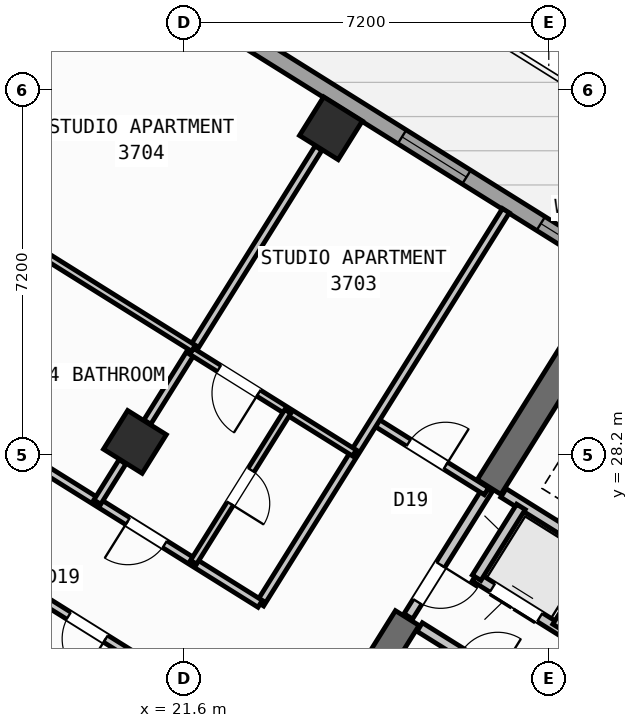
"""IFC4 building model, lengths in metres.
Left out: names, types, materials, properties, quantities, classifications, styles, units other than length and angle.
Written with IfcOpenShell. Run it as: python <this file> out.ifc"""

import sys

from ifc_helpers import new_model, si_unit, direction, frame, frame_2d, origin, origin_2d, place, context, subcontext, project, spatial, rectangle, hollow_rectangle, extrude, source, transform, mapped, element, fill, save


model = new_model("IFC4")
c1 = context("Model", 3, precision=1e-05, world=origin(), true_north=direction((0.0, 1.0)))
c2 = subcontext(c1, "Body", "Model", "MODEL_VIEW")
j1 = project(units=[si_unit("LENGTHUNIT", "METRE"), si_unit("PLANEANGLEUNIT", "RADIAN")], contexts=[c1])
p1 = place(None, origin())
s1 = spatial("IfcSite", under=j1, at=p1, CompositionType="ELEMENT")
p2 = place(p1, origin())
s2 = spatial("IfcBuilding", under=s1, at=p2, CompositionType="ELEMENT")
p3 = place(p2, frame((0.0, 0.0, 147.9)))
s3 = spatial("IfcBuildingStorey", under=s2, at=p3, CompositionType="ELEMENT", Elevation=147.9)
p4 = place(p3, frame((29.517, 30.594, 0.0), z_axis=(0.0, 0.0, 1.0), x_axis=(-0.529906864564, -0.848055844204, 0.0)))
e1 = element("IfcWall", 1, at=p4, inside=s3, PredefinedType="SHEAR", context=c2, shape_type="SweptSolid", body=[
    extrude(rectangle(XDim=3.575, YDim=0.55, at=frame_2d((1.788, 0.0))), origin(), (0.0, 0.0, 1.0), 3.35),
])
p5 = place(p3, frame((26.007, 24.976, 0.0), z_axis=(0.0, 0.0, 1.0), x_axis=(-0.529923795287, -0.848045264823, 0.0)))
e2 = element("IfcWall", 2, at=p5, inside=s3, PredefinedType="SHEAR", context=c2, shape_type="SweptSolid", body=[
    extrude(rectangle(XDim=6.425, YDim=0.55, at=frame_2d((3.212, 0.0))), origin(), (0.0, 0.0, 1.0), 3.35),
])
m1 = source(origin(), c2, "Body", "SweptSolid", [
    extrude(hollow_rectangle(XDim=0.9, YDim=0.9, WallThickness=0.036, at=origin_2d()), origin(), (0.0, 0.0, 1.0), 3.6),
])
for number, where, z_axis, x_axis in (
    (3, (24.5, 34.643, 0.0), (0.0, 0.0, 1.0), (-0.848, 0.53, 0.0)),
    (4, (20.632, 28.452, 0.0), (0.0, 0.0, 1.0), (-0.848, 0.53, 0.0)),
):
    element("IfcColumn", number, at=place(p3, frame(where, z_axis=z_axis, x_axis=x_axis)), inside=s3, PredefinedType="COLUMN", context=c2, shape_type="MappedRepresentation", body=[
        mapped(m1, transform((0.0, 0.0, 0.0), scale=1.0)),
    ])
p6 = place(p3, frame((14.138, 41.825, 0.0), z_axis=(0.0, 0.0, 1.0), x_axis=(0.848046498049, -0.529921821731, 0.0)))
e5 = element("IfcWall", 5, at=p6, inside=s3, PredefinedType="STANDARD", context=c2, shape_type="SweptSolid", body=[
    extrude(rectangle(XDim=31.588, YDim=0.32, at=frame_2d((15.794, 0.0))), origin(), (0.0, 0.0, 1.0), 3.35),
])
p7 = place(p6, frame((2.949, 0.0, 0.0)))
e6 = element("IfcOpeningElement", 6, at=p7, cuts=e5, PredefinedType="OPENING", context=c2, shape_type="SweptSolid", body=[
    extrude(rectangle(XDim=1.05, YDim=2.15, at=frame_2d((0.525, 1.075))), frame((0.0, 0.17, 0.0), z_axis=(0.0, -1.0, 0.0), x_axis=(1.0, 0.0, 0.0)), (0.0, 0.0, 1.0), 0.34),
])
p8 = place(p6, frame((0.861, 0.0, 0.85)))
e7 = element("IfcOpeningElement", 7, at=p8, cuts=e5, PredefinedType="OPENING", context=c2, shape_type="SweptSolid", body=[
    extrude(rectangle(XDim=1.5, YDim=1.5, at=frame_2d((0.75, 0.75))), frame((0.0, 0.17, 0.0), z_axis=(0.0, -1.0, 0.0), x_axis=(1.0, 0.0, 0.0)), (0.0, 0.0, 1.0), 0.34),
])
p9 = place(p6, frame((8.494, 0.0, 0.85)))
e8 = element("IfcOpeningElement", 8, at=p9, cuts=e5, PredefinedType="OPENING", context=c2, shape_type="SweptSolid", body=[
    extrude(rectangle(XDim=1.8, YDim=1.5, at=frame_2d((0.9, 0.75))), frame((0.0, 0.17, 0.0), z_axis=(0.0, -1.0, 0.0), x_axis=(1.0, 0.0, 0.0)), (0.0, 0.0, 1.0), 0.34),
])
p10 = place(p6, frame((13.874, 0.0, 0.85)))
e9 = element("IfcOpeningElement", 9, at=p10, cuts=e5, PredefinedType="OPENING", context=c2, shape_type="SweptSolid", body=[
    extrude(rectangle(XDim=1.5, YDim=1.5, at=frame_2d((0.75, 0.75))), frame((0.0, 0.17, 0.0), z_axis=(0.0, -1.0, 0.0), x_axis=(1.0, 0.0, 0.0)), (0.0, 0.0, 1.0), 0.34),
])
p11 = place(p6, frame((17.104, 0.0, 1.0)))
e10 = element("IfcOpeningElement", 10, at=p11, cuts=e5, PredefinedType="OPENING", context=c2, shape_type="SweptSolid", body=[
    extrude(rectangle(XDim=0.9, YDim=1.25, at=frame_2d((0.45, 0.625))), frame((0.0, 0.17, 0.0), z_axis=(0.0, -1.0, 0.0), x_axis=(1.0, 0.0, 0.0)), (0.0, 0.0, 1.0), 0.34),
])
p12 = place(p6, frame((22.144, 0.0, 1.0)))
e11 = element("IfcOpeningElement", 11, at=p12, cuts=e5, PredefinedType="OPENING", context=c2, shape_type="SweptSolid", body=[
    extrude(rectangle(XDim=0.9, YDim=1.25, at=frame_2d((0.45, 0.625))), frame((0.0, 0.17, 0.0), z_axis=(0.0, -1.0, 0.0), x_axis=(1.0, 0.0, 0.0)), (0.0, 0.0, 1.0), 0.34),
])
p13 = place(p6, frame((27.744, 0.0, 1.0)))
e12 = element("IfcOpeningElement", 12, at=p13, cuts=e5, PredefinedType="OPENING", context=c2, shape_type="SweptSolid", body=[
    extrude(rectangle(XDim=0.9, YDim=1.25, at=frame_2d((0.45, 0.625))), frame((0.0, 0.17, 0.0), z_axis=(0.0, -1.0, 0.0), x_axis=(1.0, 0.0, 0.0)), (0.0, 0.0, 1.0), 0.34),
])
p14 = place(p3, frame((31.822, 24.998, 0.0), z_axis=(0.0, 0.0, 1.0), x_axis=(-0.848036912365, 0.52993716162, 0.0)))
e13 = element("IfcWall", 13, at=p14, inside=s3, PredefinedType="STANDARD", context=c2, shape_type="SweptSolid", body=[
    extrude(rectangle(XDim=4.618, YDim=0.2, at=frame_2d((2.309, 0.0))), origin(), (0.0, 0.0, 1.0), 3.34),
])
p15 = place(p3, frame((32.108, 22.814, 0.0), z_axis=(0.0, 0.0, 1.0), x_axis=(-0.848042229521, 0.529928652696, 0.0)))
e14 = element("IfcWall", 14, at=p15, inside=s3, PredefinedType="STANDARD", context=c2, shape_type="SweptSolid", body=[
    extrude(rectangle(XDim=5.62, YDim=0.2, at=frame_2d((2.81, 0.0))), origin(), (0.0, 0.0, 1.0), 3.34),
])
p16 = place(p15, frame((0.39, 0.0, 0.0)))
e15 = element("IfcOpeningElement", 15, at=p16, cuts=e14, PredefinedType="OPENING", context=c2, shape_type="SweptSolid", body=[
    extrude(rectangle(XDim=1.1, YDim=2.15, at=frame_2d((0.55, 1.075))), frame((0.0, 0.11, 0.0), z_axis=(0.0, -1.0, 0.0), x_axis=(1.0, 0.0, 0.0)), (0.0, 0.0, 1.0), 0.22),
])
p17 = place(p15, frame((2.25, 0.0, 0.0)))
e16 = element("IfcOpeningElement", 16, at=p17, cuts=e14, PredefinedType="OPENING", context=c2, shape_type="SweptSolid", body=[
    extrude(rectangle(XDim=1.1, YDim=2.15, at=frame_2d((0.55, 1.075))), frame((0.0, 0.11, 0.0), z_axis=(0.0, -1.0, 0.0), x_axis=(1.0, 0.0, 0.0)), (0.0, 0.0, 1.0), 0.22),
])
p18 = place(p15, frame((4.11, 0.0, 0.0)))
e17 = element("IfcOpeningElement", 17, at=p18, cuts=e14, PredefinedType="OPENING", context=c2, shape_type="SweptSolid", body=[
    extrude(rectangle(XDim=1.1, YDim=2.15, at=frame_2d((0.55, 1.075))), frame((0.0, 0.11, 0.0), z_axis=(0.0, -1.0, 0.0), x_axis=(1.0, 0.0, 0.0)), (0.0, 0.0, 1.0), 0.22),
])
p19 = place(p3, frame((28.25, 27.17, 0.0), z_axis=(0.0, 0.0, 1.0), x_axis=(-0.529905827651, -0.848056492117, 0.0)))
e18 = element("IfcWall", 18, at=p19, inside=s3, PredefinedType="STANDARD", context=c2, shape_type="SweptSolid", body=[
    extrude(rectangle(XDim=1.65, YDim=0.2, at=frame_2d((0.825, 0.0))), origin(), (0.0, 0.0, 1.0), 3.34),
])
p20 = place(p3, frame((29.801, 26.142, 0.0), z_axis=(0.0, 0.0, 1.0), x_axis=(-0.529998940003, -0.847998304005, 0.0)))
e19 = element("IfcWall", 19, at=p20, inside=s3, PredefinedType="STANDARD", context=c2, shape_type="SweptSolid", body=[
    extrude(rectangle(XDim=1.58, YDim=0.2, at=frame_2d((0.79, 0.0))), origin(), (0.0, 0.0, 1.0), 3.34),
])
p21 = place(p3, frame((31.525, 21.504, 0.0), z_axis=(0.0, 0.0, 1.0), x_axis=(-0.848040211232, 0.529931882541, 0.0)))
e20 = element("IfcWall", 20, at=p21, inside=s3, PredefinedType="STANDARD", context=c2, shape_type="SweptSolid", body=[
    extrude(rectangle(XDim=6.218, YDim=0.2, at=frame_2d((3.109, 0.0))), origin(), (0.0, 0.0, 1.0), 3.34),
])
p22 = place(p21, frame((4.4, 0.0, 0.0)))
e21 = element("IfcOpeningElement", 21, at=p22, cuts=e20, PredefinedType="OPENING", context=c2, shape_type="SweptSolid", body=[
    extrude(rectangle(XDim=0.86, YDim=2.05, at=frame_2d((0.43, 1.025))), frame((0.0, 0.11, 0.0), z_axis=(0.0, -1.0, 0.0), x_axis=(1.0, 0.0, 0.0)), (0.0, 0.0, 1.0), 0.22),
])
p23 = place(p21, frame((1.45, 0.0, 0.0)))
e22 = element("IfcOpeningElement", 22, at=p23, cuts=e20, PredefinedType="OPENING", context=c2, shape_type="SweptSolid", body=[
    extrude(rectangle(XDim=0.86, YDim=2.05, at=frame_2d((0.43, 1.025))), frame((0.0, 0.11, 0.0), z_axis=(0.0, -1.0, 0.0), x_axis=(1.0, 0.0, 0.0)), (0.0, 0.0, 1.0), 0.22),
])
p24 = place(p3, frame((27.596, 27.52, 0.0), z_axis=(0.0, 0.0, 1.0), x_axis=(-0.529865479138, -0.848081702443, 0.0)))
e23 = element("IfcWall", 23, at=p24, inside=s3, PredefinedType="STANDARD", context=c2, shape_type="SweptSolid", body=[
    extrude(rectangle(XDim=2.96, YDim=0.2, at=frame_2d((1.48, 0.0))), origin(), (0.0, 0.0, 1.0), 3.34),
])
p25 = place(p24, frame((1.76, 0.0, 0.0)))
e24 = element("IfcOpeningElement", 24, at=p25, cuts=e23, PredefinedType="OPENING", context=c2, shape_type="SweptSolid", body=[
    extrude(rectangle(XDim=0.86, YDim=2.05, at=frame_2d((0.43, 1.025))), frame((0.0, 0.11, 0.0), z_axis=(0.0, -1.0, 0.0), x_axis=(1.0, 0.0, 0.0)), (0.0, 0.0, 1.0), 0.22),
])
p26 = place(p3, frame((27.57, 27.478, 0.0), z_axis=(0.0, 0.0, 1.0), x_axis=(-0.848050851465, 0.529914854792, 0.0)))
e25 = element("IfcWall", 25, at=p26, inside=s3, PredefinedType="PARTITIONING", context=c2, shape_type="SweptSolid", body=[
    extrude(rectangle(XDim=2.61, YDim=0.16, at=frame_2d((1.305, 0.0))), origin(), (0.0, 0.0, 1.0), 3.34),
])
p27 = place(p26, frame((0.95, 0.0, 0.0)))
e26 = element("IfcOpeningElement", 26, at=p27, cuts=e25, PredefinedType="OPENING", context=c2, shape_type="SweptSolid", body=[
    extrude(rectangle(XDim=0.86, YDim=2.05, at=frame_2d((0.43, 1.025))), frame((0.0, 0.09, 0.0), z_axis=(0.0, -1.0, 0.0), x_axis=(1.0, 0.0, 0.0)), (0.0, 0.0, 1.0), 0.18),
])
p28 = place(p3, frame((27.953, 33.016, 0.0), z_axis=(0.0, 0.0, 1.0), x_axis=(-0.529903001606, -0.848058257957, 0.0)))
e27 = element("IfcWall", 27, at=p28, inside=s3, PredefinedType="PARTITIONING", context=c2, shape_type="SweptSolid", body=[
    extrude(rectangle(XDim=9.15, YDim=0.16, at=frame_2d((4.575, 0.0))), origin(), (0.0, 0.0, 1.0), 3.34),
])
p29 = place(p3, frame((23.104, 25.256, 0.0), z_axis=(0.0, 0.0, 1.0), x_axis=(-0.848041752158, 0.529929416617, 0.0)))
e28 = element("IfcWall", 28, at=p29, inside=s3, PredefinedType="PARTITIONING", context=c2, shape_type="SweptSolid", body=[
    extrude(rectangle(XDim=16.73, YDim=0.16, at=frame_2d((8.365, 0.0))), origin(), (0.0, 0.0, 1.0), 3.34),
])
p30 = place(p29, frame((2.22, 0.0, 0.0)))
e29 = element("IfcOpeningElement", 29, at=p30, cuts=e28, PredefinedType="OPENING", context=c2, shape_type="SweptSolid", body=[
    extrude(rectangle(XDim=0.86, YDim=2.05, at=frame_2d((0.43, 1.025))), frame((0.0, 0.09, 0.0), z_axis=(0.0, -1.0, 0.0), x_axis=(1.0, 0.0, 0.0)), (0.0, 0.0, 1.0), 0.18),
])
p31 = place(p29, frame((12.084, 0.0, 0.0)))
e30 = element("IfcOpeningElement", 30, at=p31, cuts=e28, PredefinedType="OPENING", context=c2, shape_type="SweptSolid", body=[
    extrude(rectangle(XDim=1.0, YDim=2.1, at=frame_2d((0.5, 1.05))), frame((0.0, 0.09, 0.0), z_axis=(0.0, -1.0, 0.0), x_axis=(1.0, 0.0, 0.0)), (0.0, 0.0, 1.0), 0.18),
])
p32 = place(p3, frame((21.938, 23.391, 0.0), z_axis=(0.0, 0.0, 1.0), x_axis=(-0.848045850158, 0.529922858565, 0.0)))
e31 = element("IfcWall", 31, at=p32, inside=s3, PredefinedType="PARTITIONING", context=c2, shape_type="SweptSolid", body=[
    extrude(rectangle(XDim=16.73, YDim=0.16, at=frame_2d((8.365, 0.0))), origin(), (0.0, 0.0, 1.0), 3.34),
])
p33 = place(p32, frame((2.22, 0.0, 0.0)))
e32 = element("IfcOpeningElement", 32, at=p33, cuts=e31, PredefinedType="OPENING", context=c2, shape_type="SweptSolid", body=[
    extrude(rectangle(XDim=0.86, YDim=2.05, at=frame_2d((0.43, 1.025))), frame((0.0, 0.09, 0.0), z_axis=(0.0, -1.0, 0.0), x_axis=(1.0, 0.0, 0.0)), (0.0, 0.0, 1.0), 0.18),
])
p34 = place(p32, frame((14.22, 0.0, 0.0)))
e33 = element("IfcOpeningElement", 33, at=p34, cuts=e31, PredefinedType="OPENING", context=c2, shape_type="SweptSolid", body=[
    extrude(rectangle(XDim=1.0, YDim=2.1, at=frame_2d((0.5, 1.05))), frame((0.0, 0.09, 0.0), z_axis=(0.0, -1.0, 0.0), x_axis=(1.0, 0.0, 0.0)), (0.0, 0.0, 1.0), 0.18),
])
p35 = place(p3, frame((24.256, 34.251, 0.0), z_axis=(0.0, 0.0, 1.0), x_axis=(-0.529919772691, -0.848047778437, 0.0)))
e34 = element("IfcWall", 34, at=p35, inside=s3, PredefinedType="PARTITIONING", context=c2, shape_type="SweptSolid", body=[
    extrude(rectangle(XDim=6.376, YDim=0.16, at=frame_2d((3.188, 0.0))), origin(), (0.0, 0.0, 1.0), 2.775),
])
p36 = place(p3, frame((20.387, 28.06, 0.0), z_axis=(0.0, 0.0, 1.0), x_axis=(-0.529952145338, -0.848027548876, 0.0)))
e35 = element("IfcWall", 35, at=p36, inside=s3, PredefinedType="PARTITIONING", context=c2, shape_type="SweptSolid", body=[
    extrude(rectangle(XDim=0.938, YDim=0.16, at=frame_2d((0.469, 0.0))), origin(), (0.0, 0.0, 1.0), 2.775),
])
p37 = place(p3, frame((24.964, 28.233, 0.0), z_axis=(0.0, 0.0, 1.0), x_axis=(-0.848059820872, 0.529900500304, 0.0)))
e36 = element("IfcWall", 36, at=p37, inside=s3, PredefinedType="PLUMBINGWALL", context=c2, shape_type="SweptSolid", body=[
    extrude(rectangle(XDim=3.79, YDim=0.14, at=frame_2d((1.895, 0.0))), origin(), (0.0, 0.0, 1.0), 3.34),
])
p38 = place(p37, frame((2.23, 0.0, 0.0)))
e37 = element("IfcOpeningElement", 37, at=p38, cuts=e36, PredefinedType="OPENING", context=c2, shape_type="SweptSolid", body=[
    extrude(rectangle(XDim=0.92, YDim=2.08, at=frame_2d((0.46, 1.04))), frame((0.0, 0.08, 0.0), z_axis=(0.0, -1.0, 0.0), x_axis=(1.0, 0.0, 0.0)), (0.0, 0.0, 1.0), 0.16),
])
p39 = place(p3, frame((23.65, 29.054, 0.0), z_axis=(0.0, 0.0, 1.0), x_axis=(-0.529898896701, -0.848060822863, 0.0)))
e38 = element("IfcWall", 38, at=p39, inside=s3, PredefinedType="PLUMBINGWALL", context=c2, shape_type="SweptSolid", body=[
    extrude(rectangle(XDim=3.51, YDim=0.14, at=frame_2d((1.755, 0.0))), origin(), (0.0, 0.0, 1.0), 2.995),
])
p40 = place(p39, frame((1.365, 0.0, 0.0)))
e39 = element("IfcOpeningElement", 39, at=p40, cuts=e38, PredefinedType="OPENING", context=c2, shape_type="SweptSolid", body=[
    extrude(rectangle(XDim=0.78, YDim=2.05, at=frame_2d((0.39, 1.025))), frame((0.0, 0.08, 0.0), z_axis=(0.0, -1.0, 0.0), x_axis=(1.0, 0.0, 0.0)), (0.0, 0.0, 1.0), 0.16),
])
p41 = place(p3, frame((21.787, 30.301, 0.0), z_axis=(0.0, 0.0, 1.0), x_axis=(-0.848043949058, 0.52992590092, 0.0)))
e40 = element("IfcWall", 40, at=p41, inside=s3, PredefinedType="PLUMBINGWALL", context=c2, shape_type="SweptSolid", body=[
    extrude(rectangle(XDim=12.92, YDim=0.14, at=frame_2d((6.46, 0.0))), origin(), (0.0, 0.0, 1.0), 3.34),
])
p42 = place(p41, frame((5.849, 0.0, 0.0)))
e41 = element("IfcOpeningElement", 41, at=p42, cuts=e40, PredefinedType="OPENING", context=c2, shape_type="SweptSolid", body=[
    extrude(rectangle(XDim=0.92, YDim=2.08, at=frame_2d((0.46, 1.04))), frame((0.0, 0.08, 0.0), z_axis=(0.0, -1.0, 0.0), x_axis=(1.0, 0.0, 0.0)), (0.0, 0.0, 1.0), 0.16),
])
m2 = source(origin(), c2, "Body", "SweptSolid", [
    extrude(rectangle(XDim=1.5, YDim=1.5, at=frame_2d((0.75, 0.75))), frame((0.0, 0.03, 0.0), z_axis=(0.0, -1.0, 0.0), x_axis=(1.0, 0.0, 0.0)), (0.0, 0.0, 1.0), 0.06),
])
p43 = place(p10, origin())
e42 = element("IfcWindow", 42, at=p43, inside=s3, PartitioningType="SINGLE_PANEL", PredefinedType="WINDOW", context=c2, shape_type="MappedRepresentation", body=[
    mapped(m2, transform((0.0, 0.0, 0.0), scale=1.0)),
])
fill(e9, e42)
m3 = source(origin(), c2, "Body", "SweptSolid", [
    extrude(rectangle(XDim=0.9, YDim=1.25, at=frame_2d((0.45, 0.625))), frame((0.0, 0.03, 0.0), z_axis=(0.0, -1.0, 0.0), x_axis=(1.0, 0.0, 0.0)), (0.0, 0.0, 1.0), 0.06),
])
p44 = place(p11, origin())
e43 = element("IfcWindow", 43, at=p44, inside=s3, PartitioningType="SINGLE_PANEL", PredefinedType="WINDOW", context=c2, shape_type="MappedRepresentation", body=[
    mapped(m3, transform((0.0, 0.0, 0.0), scale=1.0)),
])
fill(e10, e43)
m4 = source(origin(), c2, "Body", "SweptSolid", [
    extrude(rectangle(XDim=1.1, YDim=2.15, at=frame_2d((0.55, 1.075))), frame((0.0, 0.025, 0.0), z_axis=(0.0, -1.0, 0.0), x_axis=(1.0, 0.0, 0.0)), (0.0, 0.0, 1.0), 0.05),
])
p45 = place(p18, origin())
e44 = element("IfcDoor", 44, at=p45, inside=s3, OperationType="DOUBLE_DOOR_SLIDING", PredefinedType="DOOR", context=c2, shape_type="MappedRepresentation", body=[
    mapped(m4, transform((0.0, 0.0, 0.0), scale=1.0)),
])
fill(e17, e44)
m5 = source(origin(), c2, "Body", "SweptSolid", [
    extrude(rectangle(XDim=0.86, YDim=2.05, at=frame_2d((0.43, 1.025))), frame((0.0, 0.025, 0.0), z_axis=(0.0, -1.0, 0.0), x_axis=(1.0, 0.0, 0.0)), (0.0, 0.0, 1.0), 0.05),
])
p46 = place(p27, frame((0.86, 0.0, 0.0), z_axis=(0.0, 0.0, 1.0), x_axis=(-1.0, 0.0, 0.0)))
e45 = element("IfcDoor", 45, at=p46, inside=s3, OperationType="SINGLE_SWING_RIGHT", PredefinedType="DOOR", context=c2, shape_type="MappedRepresentation", body=[
    mapped(m5, transform((0.0, 0.0, 0.0), scale=1.0)),
])
fill(e26, e45)
p47 = place(p25, origin())
e46 = element("IfcDoor", 46, at=p47, inside=s3, OperationType="SINGLE_SWING_LEFT", PredefinedType="DOOR", context=c2, shape_type="MappedRepresentation", body=[
    mapped(m5, transform((0.0, 0.0, 0.0), scale=1.0)),
])
fill(e24, e46)
p48 = place(p33, origin())
e47 = element("IfcDoor", 47, at=p48, inside=s3, OperationType="SINGLE_SWING_LEFT", PredefinedType="DOOR", context=c2, shape_type="MappedRepresentation", body=[
    mapped(m5, transform((0.0, 0.0, 0.0), scale=1.0)),
])
fill(e32, e47)
p49 = place(p30, origin())
e48 = element("IfcDoor", 48, at=p49, inside=s3, OperationType="SINGLE_SWING_RIGHT", PredefinedType="DOOR", context=c2, shape_type="MappedRepresentation", body=[
    mapped(m5, transform((0.0, 0.0, 0.0), scale=1.0)),
])
fill(e29, e48)
m6 = source(origin(), c2, "Body", "SweptSolid", [
    extrude(rectangle(XDim=0.92, YDim=2.08, at=frame_2d((0.46, 1.04))), frame((0.0, 0.025, 0.0), z_axis=(0.0, -1.0, 0.0), x_axis=(1.0, 0.0, 0.0)), (0.0, 0.0, 1.0), 0.05),
])
p50 = place(p38, origin())
e49 = element("IfcDoor", 49, at=p50, inside=s3, OperationType="SINGLE_SWING_LEFT", PredefinedType="DOOR", context=c2, shape_type="MappedRepresentation", body=[
    mapped(m6, transform((0.0, 0.0, 0.0), scale=1.0)),
])
fill(e37, e49)
m7 = source(origin(), c2, "Body", "SweptSolid", [
    extrude(rectangle(XDim=0.78, YDim=2.05, at=frame_2d((0.39, 1.025))), frame((0.0, 0.025, 0.0), z_axis=(0.0, -1.0, 0.0), x_axis=(1.0, 0.0, 0.0)), (0.0, 0.0, 1.0), 0.05),
])
p51 = place(p40, origin())
e50 = element("IfcDoor", 50, at=p51, inside=s3, OperationType="SINGLE_SWING_RIGHT", PredefinedType="DOOR", context=c2, shape_type="MappedRepresentation", body=[
    mapped(m7, transform((0.0, 0.0, 0.0), scale=1.0)),
])
fill(e39, e50)
save(model, sys.argv[1])
